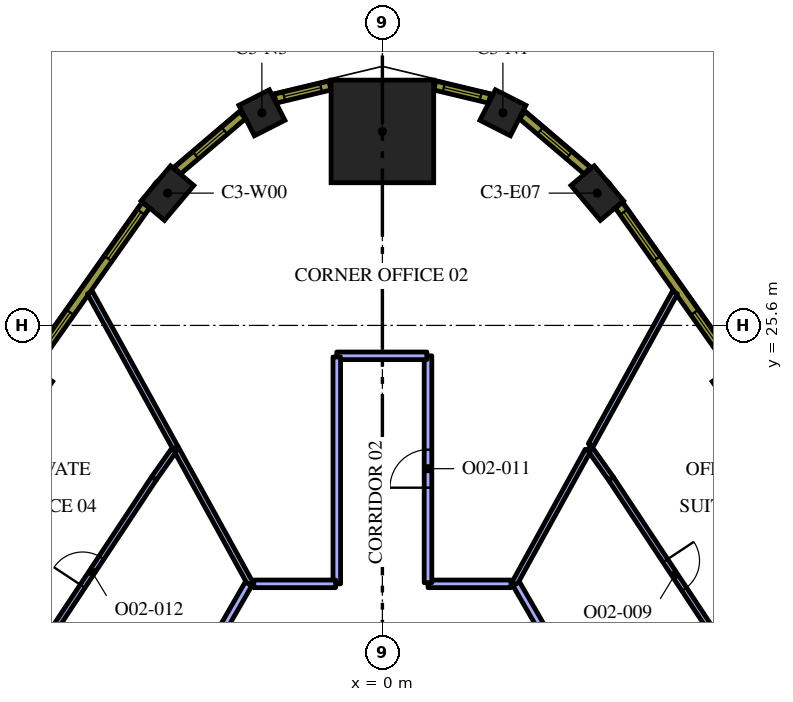
"""IFC4 building model, lengths in metres.
Left out: names, types, materials, properties, quantities, classifications, styles, units other than length and angle.
Written with IfcOpenShell. Run it as: python <this file> out.ifc"""

import sys

from ifc_helpers import new_model, si_unit, direction, frame, frame_2d, origin, origin_2d, place, context, subcontext, project, spatial, rectangle, extrude, element, fill, save


model = new_model("IFC4")
c1 = context("Model", 3, precision=1e-05, world=origin(), true_north=direction((0.0, 1.0)))
c2 = subcontext(c1, "Body", "Model", "MODEL_VIEW")
j1 = project(units=[si_unit("LENGTHUNIT", "METRE"), si_unit("PLANEANGLEUNIT", "RADIAN")], contexts=[c1])
p1 = place(None, origin())
s1 = spatial("IfcSite", under=j1, at=p1, CompositionType="ELEMENT")
p2 = place(p1, origin())
s2 = spatial("IfcBuilding", under=s1, at=p2, CompositionType="ELEMENT")
p3 = place(p2, frame((0.0, 0.0, 154.2)))
s3 = spatial("IfcBuildingStorey", under=s2, at=p3, CompositionType="ELEMENT", Elevation=154.2)
p4 = place(p3, frame((0.0, 30.704, 0.0), z_axis=(0.0, 0.0, 1.0), x_axis=(0.0, 1.0, 0.0)))
e1 = element("IfcColumn", 1, at=p4, inside=s3, PredefinedType="COLUMN", context=c2, shape_type="SweptSolid", body=[
    extrude(rectangle(XDim=2.7, YDim=2.7, at=origin_2d()), origin(), (0.0, 0.0, 1.0), 4.2),
])
for number, where, z_axis, x_axis in (
    (2, (9.348, 23.854, 0.0), (0.0, 0.0, 1.0), (-0.565, 0.825, 0.0)),
    (3, (5.654, 29.081, 0.0), (0.0, 0.0, 1.0), (-0.644, 0.765, 0.0)),
):
    element("IfcColumn", number, at=place(p3, frame(where, z_axis=z_axis, x_axis=x_axis)), inside=s3, PredefinedType="COLUMN", context=c2, shape_type="SweptSolid", body=[
        extrude(rectangle(XDim=1.2, YDim=0.8, at=origin_2d()), origin(), (0.0, 0.0, 1.0), 4.2),
    ])
for number, where, z_axis, x_axis in (
    (4, (3.171, 31.195, 0.0), (0.0, 0.0, 1.0), (-0.891, 0.453, 0.0)),
    (5, (-3.171, 31.195, 0.0), (0.0, 0.0, 1.0), (-0.891, -0.453, 0.0)),
):
    element("IfcColumn", number, at=place(p3, frame(where, z_axis=z_axis, x_axis=x_axis)), inside=s3, PredefinedType="COLUMN", context=c2, shape_type="SweptSolid", body=[
        extrude(rectangle(XDim=0.9, YDim=0.9, at=origin_2d()), origin(), (0.0, 0.0, 1.0), 4.2),
    ])
for number, where, z_axis, x_axis in (
    (6, (-5.654, 29.081, 0.0), (0.0, 0.0, 1.0), (-0.644, -0.765, 0.0)),
    (7, (-9.348, 23.854, 0.0), (0.0, 0.0, 1.0), (-0.565, -0.825, 0.0)),
):
    element("IfcColumn", number, at=place(p3, frame(where, z_axis=z_axis, x_axis=x_axis)), inside=s3, PredefinedType="COLUMN", context=c2, shape_type="SweptSolid", body=[
        extrude(rectangle(XDim=1.2, YDim=0.8, at=origin_2d()), origin(), (0.0, 0.0, 1.0), 4.2),
    ])
p5 = place(p3, frame((6.013, 21.573, 0.0), z_axis=(0.0, 0.0, 1.0), x_axis=(0.551906048292, -0.833906298009, 0.0)))
e8 = element("IfcWall", 8, at=p5, inside=s3, PredefinedType="PARTITIONING", context=c2, shape_type="SweptSolid", body=[
    extrude(rectangle(XDim=5.995, YDim=0.15, at=frame_2d((2.998, 0.0))), origin(), (0.0, 0.0, 1.0), 3.15),
])
p6 = place(p5, frame((2.595, 0.0, 0.0)))
e9 = element("IfcOpeningElement", 9, at=p6, cuts=e8, PredefinedType="OPENING", context=c2, shape_type="SweptSolid", body=[
    extrude(rectangle(XDim=0.9, YDim=2.1, at=frame_2d((0.45, 1.05))), frame((0.0, 0.085, 0.0), z_axis=(0.0, -1.0, 0.0), x_axis=(1.0, 0.0, 0.0)), (0.0, 0.0, 1.0), 0.17),
])
p7 = place(p3, frame((6.013, 21.573, 0.0), z_axis=(0.0, 0.0, 1.0), x_axis=(-0.576965221715, 0.816768714467, 0.0)))
e10 = element("IfcWall", 10, at=p7, inside=s3, PredefinedType="PARTITIONING", context=c2, shape_type="SweptSolid", body=[
    extrude(rectangle(XDim=0.986, YDim=0.15, at=frame_2d((0.493, 0.0))), origin(), (0.0, 0.0, 1.0), 3.15),
])
p8 = place(p3, frame((5.484, 22.451, 0.0), z_axis=(0.0, 0.0, 1.0), x_axis=(0.483018213307, 0.875610304652, 0.0)))
e11 = element("IfcWall", 11, at=p8, inside=s3, PredefinedType="PARTITIONING", context=c2, shape_type="SweptSolid", body=[
    extrude(rectangle(XDim=4.584, YDim=0.15, at=frame_2d((2.292, 0.0))), origin(), (0.0, 0.0, 1.0), 3.15),
])
p9 = place(p3, frame((3.47, 18.8, 0.0), z_axis=(0.0, 0.0, 1.0), x_axis=(0.483004783308, 0.87561771299, 0.0)))
e12 = element("IfcWall", 12, at=p9, inside=s3, PredefinedType="PARTITIONING", context=c2, shape_type="SweptSolid", body=[
    extrude(rectangle(XDim=4.003, YDim=0.15, at=frame_2d((2.001, 0.0))), origin(), (0.0, 0.0, 1.0), 3.15),
])
p10 = place(p3, frame((8.515, 10.152, 0.0), z_axis=(0.0, 0.0, 1.0), x_axis=(-0.499998974385, 0.866025995923, 0.0)))
e13 = element("IfcWall", 13, at=p10, inside=s3, PredefinedType="PARTITIONING", context=c2, shape_type="SweptSolid", body=[
    extrude(rectangle(XDim=9.986, YDim=0.2, at=frame_2d((4.993, 0.0))), origin(), (0.0, 0.0, 1.0), 3.15),
])
p11 = place(p10, frame((4.5, 0.0, 0.0)))
e14 = element("IfcOpeningElement", 14, at=p11, cuts=e13, PredefinedType="OPENING", context=c2, shape_type="SweptSolid", body=[
    extrude(rectangle(XDim=1.0, YDim=2.1, at=frame_2d((0.5, 1.05))), frame((0.0, 0.11, 0.0), z_axis=(0.0, -1.0, 0.0), x_axis=(1.0, 0.0, 0.0)), (0.0, 0.0, 1.0), 0.22),
])
p12 = place(p3, frame((-5.442, 22.374, 0.0), z_axis=(0.0, 0.0, 1.0), x_axis=(-0.482987550425, 0.875627218703, 0.0)))
e15 = element("IfcWall", 15, at=p12, inside=s3, PredefinedType="PARTITIONING", context=c2, shape_type="SweptSolid", body=[
    extrude(rectangle(XDim=4.672, YDim=0.15, at=frame_2d((2.336, 0.0))), origin(), (0.0, 0.0, 1.0), 3.15),
])
p13 = place(p3, frame((-3.47, 18.8, 0.0), z_axis=(0.0, 0.0, 1.0), x_axis=(-0.482974768035, 0.875634269225, 0.0)))
e16 = element("IfcWall", 16, at=p13, inside=s3, PredefinedType="PARTITIONING", context=c2, shape_type="SweptSolid", body=[
    extrude(rectangle(XDim=4.09, YDim=0.15, at=frame_2d((2.045, 0.0))), origin(), (0.0, 0.0, 1.0), 3.15),
])
p14 = place(p3, frame((3.385, 18.8, 0.0), z_axis=(0.0, 0.0, 1.0), x_axis=(-1.0, 0.0, 0.0)))
e17 = element("IfcWall", 17, at=p14, inside=s3, PredefinedType="PARTITIONING", context=c2, shape_type="SweptSolid", body=[
    extrude(rectangle(XDim=2.185, YDim=0.2, at=frame_2d((1.092, 0.0))), origin(), (0.0, 0.0, 1.0), 3.15),
])
p15 = place(p3, frame((1.2, 18.83, 0.0), z_axis=(0.0, 0.0, 1.0), x_axis=(0.0, 1.0, 0.0)))
e18 = element("IfcWall", 18, at=p15, inside=s3, PredefinedType="PARTITIONING", context=c2, shape_type="SweptSolid", body=[
    extrude(rectangle(XDim=5.97, YDim=0.2, at=frame_2d((2.985, 0.0))), origin(), (0.0, 0.0, 1.0), 3.15),
])
p16 = place(p15, frame((2.5, 0.0, 0.0)))
e19 = element("IfcOpeningElement", 19, at=p16, cuts=e18, PredefinedType="OPENING", context=c2, shape_type="SweptSolid", body=[
    extrude(rectangle(XDim=1.0, YDim=2.1, at=frame_2d((0.5, 1.05))), frame((0.0, 0.11, 0.0), z_axis=(0.0, -1.0, 0.0), x_axis=(1.0, 0.0, 0.0)), (0.0, 0.0, 1.0), 0.22),
])
p17 = place(p3, frame((1.17, 24.8, 0.0), z_axis=(0.0, 0.0, 1.0), x_axis=(-1.0, 0.0, 0.0)))
e20 = element("IfcWall", 20, at=p17, inside=s3, PredefinedType="PARTITIONING", context=c2, shape_type="SweptSolid", body=[
    extrude(rectangle(XDim=2.37, YDim=0.2, at=frame_2d((1.185, 0.0))), origin(), (0.0, 0.0, 1.0), 3.15),
])
p18 = place(p3, frame((-1.2, 24.77, 0.0), z_axis=(0.0, 0.0, 1.0), x_axis=(0.0, -1.0, 0.0)))
e21 = element("IfcWall", 21, at=p18, inside=s3, PredefinedType="PARTITIONING", context=c2, shape_type="SweptSolid", body=[
    extrude(rectangle(XDim=5.97, YDim=0.2, at=frame_2d((2.985, 0.0))), origin(), (0.0, 0.0, 1.0), 3.15),
])
p19 = place(p3, frame((-1.23, 18.8, 0.0), z_axis=(0.0, 0.0, 1.0), x_axis=(-1.0, 0.0, 0.0)))
e22 = element("IfcWall", 22, at=p19, inside=s3, PredefinedType="PARTITIONING", context=c2, shape_type="SweptSolid", body=[
    extrude(rectangle(XDim=2.155, YDim=0.2, at=frame_2d((1.077, 0.0))), origin(), (0.0, 0.0, 1.0), 3.15),
])
p20 = place(p3, frame((-5.492, 22.31, 0.0), z_axis=(0.0, 0.0, 1.0), x_axis=(-0.576980663571, -0.816757806124, 0.0)))
e23 = element("IfcWall", 23, at=p20, inside=s3, PredefinedType="PARTITIONING", context=c2, shape_type="SweptSolid", body=[
    extrude(rectangle(XDim=0.902, YDim=0.15, at=frame_2d((0.451, 0.0))), origin(), (0.0, 0.0, 1.0), 3.15),
])
p21 = place(p3, frame((-9.322, 16.573, 0.0), z_axis=(0.0, 0.0, 1.0), x_axis=(0.551906048292, 0.833906298009, 0.0)))
e24 = element("IfcWall", 24, at=p21, inside=s3, PredefinedType="PARTITIONING", context=c2, shape_type="SweptSolid", body=[
    extrude(rectangle(XDim=5.995, YDim=0.15, at=frame_2d((2.998, 0.0))), origin(), (0.0, 0.0, 1.0), 3.15),
])
p22 = place(p21, frame((2.595, 0.0, 0.0)))
e25 = element("IfcOpeningElement", 25, at=p22, cuts=e24, PredefinedType="OPENING", context=c2, shape_type="SweptSolid", body=[
    extrude(rectangle(XDim=0.9, YDim=2.1, at=frame_2d((0.45, 1.05))), frame((0.0, 0.085, 0.0), z_axis=(0.0, -1.0, 0.0), x_axis=(1.0, 0.0, 0.0)), (0.0, 0.0, 1.0), 0.17),
])
p23 = place(p3, frame((-3.522, 18.8, 0.0), z_axis=(0.0, 0.0, 1.0), x_axis=(-0.500015783377, -0.866016291056, 0.0)))
e26 = element("IfcWall", 26, at=p23, inside=s3, PredefinedType="PARTITIONING", context=c2, shape_type="SweptSolid", body=[
    extrude(rectangle(XDim=9.99, YDim=0.2, at=frame_2d((4.995, 0.0))), origin(), (0.0, 0.0, 1.0), 3.15),
])
p24 = place(p23, frame((4.5, 0.0, 0.0)))
e27 = element("IfcOpeningElement", 27, at=p24, cuts=e26, PredefinedType="OPENING", context=c2, shape_type="SweptSolid", body=[
    extrude(rectangle(XDim=1.0, YDim=2.1, at=frame_2d((0.5, 1.05))), frame((0.0, 0.11, 0.0), z_axis=(0.0, -1.0, 0.0), x_axis=(1.0, 0.0, 0.0)), (0.0, 0.0, 1.0), 0.22),
])
p25 = place(p3, frame((9.231, 24.504, 0.0), z_axis=(0.0, 0.0, 1.0), x_axis=(-0.577115207679, 0.816662743772, 0.0)))
e28 = element("IfcWall", 28, at=p25, inside=s3, PredefinedType="SOLIDWALL", context=c2, shape_type="SweptSolid", body=[
    extrude(rectangle(XDim=5.213, YDim=0.24, at=frame_2d((2.606, 0.0))), origin(), (0.0, 0.0, 1.0), 3.95),
])
p26 = place(p25, frame((0.261, 0.0, 0.9)))
e29 = element("IfcOpeningElement", 29, at=p26, cuts=e28, PredefinedType="OPENING", context=c2, shape_type="SweptSolid", body=[
    extrude(rectangle(XDim=1.5, YDim=2.55, at=frame_2d((0.75, 1.275))), frame((0.0, 0.13, 0.0), z_axis=(0.0, -1.0, 0.0), x_axis=(1.0, 0.0, 0.0)), (0.0, 0.0, 1.0), 0.26),
])
p27 = place(p25, frame((3.492, 0.0, 0.9)))
e30 = element("IfcOpeningElement", 30, at=p27, cuts=e28, PredefinedType="OPENING", context=c2, shape_type="SweptSolid", body=[
    extrude(rectangle(XDim=1.5, YDim=2.55, at=frame_2d((0.75, 1.275))), frame((0.0, 0.13, 0.0), z_axis=(0.0, -1.0, 0.0), x_axis=(1.0, 0.0, 0.0)), (0.0, 0.0, 1.0), 0.26),
])
p28 = place(p3, frame((5.392, 29.672, 0.0), z_axis=(0.0, 0.0, 1.0), x_axis=(-0.761419744247, 0.648259186645, 0.0)))
e31 = element("IfcWall", 31, at=p28, inside=s3, PredefinedType="SOLIDWALL", context=c2, shape_type="SweptSolid", body=[
    extrude(rectangle(XDim=2.25, YDim=0.24, at=frame_2d((1.125, 0.0))), origin(), (0.0, 0.0, 1.0), 3.95),
])
p29 = place(p28, frame((0.625, 0.0, 0.9)))
e32 = element("IfcOpeningElement", 32, at=p29, cuts=e31, PredefinedType="OPENING", context=c2, shape_type="SweptSolid", body=[
    extrude(rectangle(XDim=1.0, YDim=2.55, at=frame_2d((0.5, 1.275))), frame((0.0, 0.13, 0.0), z_axis=(0.0, -1.0, 0.0), x_axis=(1.0, 0.0, 0.0)), (0.0, 0.0, 1.0), 0.26),
])
p30 = place(p3, frame((2.821, 31.566, 0.0), z_axis=(0.0, 0.0, 1.0), x_axis=(-0.972479955788, 0.232986556673, 0.0)))
e33 = element("IfcWall", 33, at=p30, inside=s3, PredefinedType="SOLIDWALL", context=c2, shape_type="SweptSolid", body=[
    extrude(rectangle(XDim=1.482, YDim=0.24, at=frame_2d((0.741, 0.0))), origin(), (0.0, 0.0, 1.0), 3.95),
])
p31 = place(p30, frame((0.241, 0.0, 0.9)))
e34 = element("IfcOpeningElement", 34, at=p31, cuts=e33, PredefinedType="OPENING", context=c2, shape_type="SweptSolid", body=[
    extrude(rectangle(XDim=1.0, YDim=2.55, at=frame_2d((0.5, 1.275))), frame((0.0, 0.13, 0.0), z_axis=(0.0, -1.0, 0.0), x_axis=(1.0, 0.0, 0.0)), (0.0, 0.0, 1.0), 0.26),
])
p32 = place(p3, frame((-1.38, 31.912, 0.0), z_axis=(0.0, 0.0, 1.0), x_axis=(-0.972479955788, -0.232986556673, 0.0)))
e35 = element("IfcWall", 35, at=p32, inside=s3, PredefinedType="SOLIDWALL", context=c2, shape_type="SweptSolid", body=[
    extrude(rectangle(XDim=1.482, YDim=0.24, at=frame_2d((0.741, 0.0))), origin(), (0.0, 0.0, 1.0), 3.95),
])
p33 = place(p32, frame((0.241, 0.0, 0.9)))
e36 = element("IfcOpeningElement", 36, at=p33, cuts=e35, PredefinedType="OPENING", context=c2, shape_type="SweptSolid", body=[
    extrude(rectangle(XDim=1.0, YDim=2.55, at=frame_2d((0.5, 1.275))), frame((0.0, 0.13, 0.0), z_axis=(0.0, -1.0, 0.0), x_axis=(1.0, 0.0, 0.0)), (0.0, 0.0, 1.0), 0.26),
])
p34 = place(p3, frame((-3.678, 31.131, 0.0), z_axis=(0.0, 0.0, 1.0), x_axis=(-0.761419744247, -0.648259186645, 0.0)))
e37 = element("IfcWall", 37, at=p34, inside=s3, PredefinedType="SOLIDWALL", context=c2, shape_type="SweptSolid", body=[
    extrude(rectangle(XDim=2.25, YDim=0.24, at=frame_2d((1.125, 0.0))), origin(), (0.0, 0.0, 1.0), 3.95),
])
p35 = place(p34, frame((0.625, 0.0, 0.9)))
e38 = element("IfcOpeningElement", 38, at=p35, cuts=e37, PredefinedType="OPENING", context=c2, shape_type="SweptSolid", body=[
    extrude(rectangle(XDim=1.0, YDim=2.55, at=frame_2d((0.5, 1.275))), frame((0.0, 0.13, 0.0), z_axis=(0.0, -1.0, 0.0), x_axis=(1.0, 0.0, 0.0)), (0.0, 0.0, 1.0), 0.26),
])
p36 = place(p3, frame((-6.223, 28.762, 0.0), z_axis=(0.0, 0.0, 1.0), x_axis=(-0.577115207679, -0.816662743772, 0.0)))
e39 = element("IfcWall", 39, at=p36, inside=s3, PredefinedType="SOLIDWALL", context=c2, shape_type="SweptSolid", body=[
    extrude(rectangle(XDim=5.213, YDim=0.24, at=frame_2d((2.606, 0.0))), origin(), (0.0, 0.0, 1.0), 3.95),
])
p37 = place(p36, frame((0.221, 0.0, 0.9)))
e40 = element("IfcOpeningElement", 40, at=p37, cuts=e39, PredefinedType="OPENING", context=c2, shape_type="SweptSolid", body=[
    extrude(rectangle(XDim=1.5, YDim=2.55, at=frame_2d((0.75, 1.275))), frame((0.0, 0.13, 0.0), z_axis=(0.0, -1.0, 0.0), x_axis=(1.0, 0.0, 0.0)), (0.0, 0.0, 1.0), 0.26),
])
p38 = place(p36, frame((3.452, 0.0, 0.9)))
e41 = element("IfcOpeningElement", 41, at=p38, cuts=e39, PredefinedType="OPENING", context=c2, shape_type="SweptSolid", body=[
    extrude(rectangle(XDim=1.5, YDim=2.55, at=frame_2d((0.75, 1.275))), frame((0.0, 0.13, 0.0), z_axis=(0.0, -1.0, 0.0), x_axis=(1.0, 0.0, 0.0)), (0.0, 0.0, 1.0), 0.26),
])
p39 = place(p6, origin())
e42 = element("IfcDoor", 42, at=p39, inside=s3, OperationType="SINGLE_SWING_RIGHT", PredefinedType="DOOR", context=c2, shape_type="SweptSolid", body=[
    extrude(rectangle(XDim=0.9, YDim=2.1, at=frame_2d((0.45, 1.05))), frame((0.0, 0.025, 0.0), z_axis=(0.0, -1.0, 0.0), x_axis=(1.0, 0.0, 0.0)), (0.0, 0.0, 1.0), 0.05),
])
fill(e9, e42)
p40 = place(p16, origin())
e43 = element("IfcDoor", 43, at=p40, inside=s3, OperationType="SINGLE_SWING_RIGHT", PredefinedType="DOOR", context=c2, shape_type="SweptSolid", body=[
    extrude(rectangle(XDim=1.0, YDim=2.1, at=frame_2d((0.5, 1.05))), frame((0.0, 0.025, 0.0), z_axis=(0.0, -1.0, 0.0), x_axis=(1.0, 0.0, 0.0)), (0.0, 0.0, 1.0), 0.05),
])
fill(e19, e43)
p41 = place(p22, origin())
e44 = element("IfcDoor", 44, at=p41, inside=s3, OperationType="SINGLE_SWING_RIGHT", PredefinedType="DOOR", context=c2, shape_type="SweptSolid", body=[
    extrude(rectangle(XDim=0.9, YDim=2.1, at=frame_2d((0.45, 1.05))), frame((0.0, 0.025, 0.0), z_axis=(0.0, -1.0, 0.0), x_axis=(1.0, 0.0, 0.0)), (0.0, 0.0, 1.0), 0.05),
])
fill(e25, e44)
p42 = place(p26, origin())
e45 = element("IfcWindow", 45, at=p42, inside=s3, PartitioningType="SINGLE_PANEL", PredefinedType="WINDOW", context=c2, shape_type="SweptSolid", body=[
    extrude(rectangle(XDim=1.5, YDim=2.55, at=frame_2d((0.75, 1.275))), frame((0.0, 0.04, 0.0), z_axis=(0.0, -1.0, 0.0), x_axis=(1.0, 0.0, 0.0)), (0.0, 0.0, 1.0), 0.06),
])
fill(e29, e45)
p43 = place(p27, origin())
e46 = element("IfcWindow", 46, at=p43, inside=s3, PartitioningType="SINGLE_PANEL", PredefinedType="WINDOW", context=c2, shape_type="SweptSolid", body=[
    extrude(rectangle(XDim=1.5, YDim=2.55, at=frame_2d((0.75, 1.275))), frame((0.0, 0.04, 0.0), z_axis=(0.0, -1.0, 0.0), x_axis=(1.0, 0.0, 0.0)), (0.0, 0.0, 1.0), 0.06),
])
fill(e30, e46)
p44 = place(p29, origin())
e47 = element("IfcWindow", 47, at=p44, inside=s3, PartitioningType="SINGLE_PANEL", PredefinedType="WINDOW", context=c2, shape_type="SweptSolid", body=[
    extrude(rectangle(XDim=1.0, YDim=2.55, at=frame_2d((0.5, 1.275))), frame((0.0, 0.04, 0.0), z_axis=(0.0, -1.0, 0.0), x_axis=(1.0, 0.0, 0.0)), (0.0, 0.0, 1.0), 0.06),
])
fill(e32, e47)
p45 = place(p31, origin())
e48 = element("IfcWindow", 48, at=p45, inside=s3, PartitioningType="SINGLE_PANEL", PredefinedType="WINDOW", context=c2, shape_type="SweptSolid", body=[
    extrude(rectangle(XDim=1.0, YDim=2.55, at=frame_2d((0.5, 1.275))), frame((0.0, 0.04, 0.0), z_axis=(0.0, -1.0, 0.0), x_axis=(1.0, 0.0, 0.0)), (0.0, 0.0, 1.0), 0.06),
])
fill(e34, e48)
p46 = place(p33, origin())
e49 = element("IfcWindow", 49, at=p46, inside=s3, PartitioningType="SINGLE_PANEL", PredefinedType="WINDOW", context=c2, shape_type="SweptSolid", body=[
    extrude(rectangle(XDim=1.0, YDim=2.55, at=frame_2d((0.5, 1.275))), frame((0.0, 0.04, 0.0), z_axis=(0.0, -1.0, 0.0), x_axis=(1.0, 0.0, 0.0)), (0.0, 0.0, 1.0), 0.06),
])
fill(e36, e49)
p47 = place(p35, origin())
e50 = element("IfcWindow", 50, at=p47, inside=s3, PartitioningType="SINGLE_PANEL", PredefinedType="WINDOW", context=c2, shape_type="SweptSolid", body=[
    extrude(rectangle(XDim=1.0, YDim=2.55, at=frame_2d((0.5, 1.275))), frame((0.0, 0.04, 0.0), z_axis=(0.0, -1.0, 0.0), x_axis=(1.0, 0.0, 0.0)), (0.0, 0.0, 1.0), 0.06),
])
fill(e38, e50)
p48 = place(p37, origin())
e51 = element("IfcWindow", 51, at=p48, inside=s3, PartitioningType="SINGLE_PANEL", PredefinedType="WINDOW", context=c2, shape_type="SweptSolid", body=[
    extrude(rectangle(XDim=1.5, YDim=2.55, at=frame_2d((0.75, 1.275))), frame((0.0, 0.04, 0.0), z_axis=(0.0, -1.0, 0.0), x_axis=(1.0, 0.0, 0.0)), (0.0, 0.0, 1.0), 0.06),
])
fill(e40, e51)
p49 = place(p38, origin())
e52 = element("IfcWindow", 52, at=p49, inside=s3, PartitioningType="SINGLE_PANEL", PredefinedType="WINDOW", context=c2, shape_type="SweptSolid", body=[
    extrude(rectangle(XDim=1.5, YDim=2.55, at=frame_2d((0.75, 1.275))), frame((0.0, 0.04, 0.0), z_axis=(0.0, -1.0, 0.0), x_axis=(1.0, 0.0, 0.0)), (0.0, 0.0, 1.0), 0.06),
])
fill(e41, e52)
save(model, sys.argv[1])
